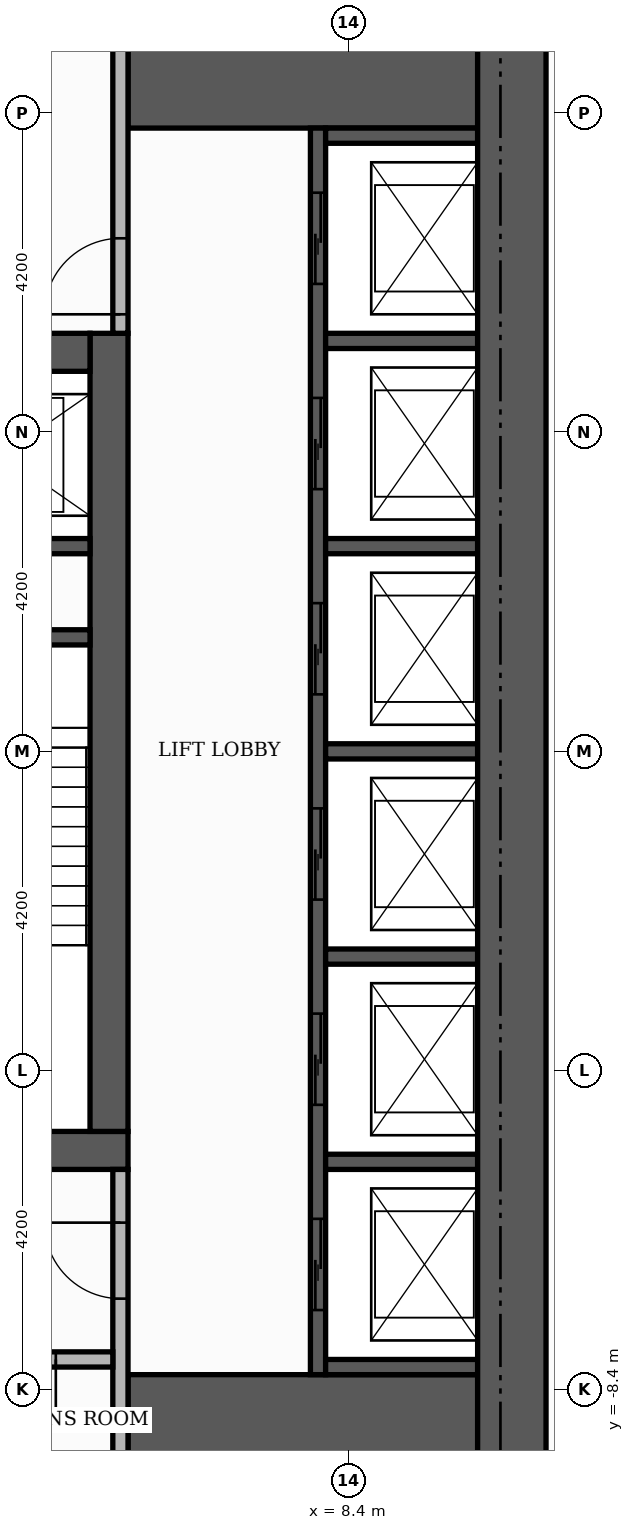
"""IFC4 building model, lengths in metres.
Left out: names, types, materials, properties, quantities, classifications, styles, units other than length and angle.
Written with IfcOpenShell. Run it as: python <this file> out.ifc"""

import sys

from ifc_helpers import new_model, si_unit, direction, frame, frame_2d, origin, place, context, subcontext, project, spatial, rectangle, extrude, element, fill, save


model = new_model("IFC4")
c1 = context("Model", 3, precision=1e-05, world=origin(), true_north=direction((0.0, 1.0)))
c2 = subcontext(c1, "Body", "Model", "MODEL_VIEW")
j1 = project(units=[si_unit("LENGTHUNIT", "METRE"), si_unit("PLANEANGLEUNIT", "RADIAN")], contexts=[c1])
p1 = place(None, origin())
s1 = spatial("IfcSite", under=j1, at=p1, CompositionType="ELEMENT")
p2 = place(p1, origin())
s2 = spatial("IfcBuilding", under=s1, at=p2, CompositionType="ELEMENT")
p3 = place(p2, frame((0.0, 0.0, 180.6)))
s3 = spatial("IfcBuildingStorey", under=s2, at=p3, CompositionType="ELEMENT", Elevation=180.6)
p4 = place(p3, frame((-5.5, -5.25, 0.0), z_axis=(0.0, 0.0, 1.0), x_axis=(1.0, 0.0, 0.0)))
e1 = element("IfcWall", 1, at=p4, inside=s3, PredefinedType="SHEAR", context=c2, shape_type="SweptSolid", body=[
    extrude(rectangle(XDim=11.0, YDim=0.5, at=frame_2d((5.5, 0.0))), origin(), (0.0, 0.0, 1.0), 7.38),
])
p5 = place(p4, frame((4.9, 0.0, 0.0)))
e2 = element("IfcOpeningElement", 2, at=p5, cuts=e1, PredefinedType="OPENING", context=c2, shape_type="SweptSolid", body=[
    extrude(rectangle(XDim=1.2, YDim=2.1, at=frame_2d((0.6, 1.05))), frame((0.0, 0.26, 0.0), z_axis=(0.0, -1.0, 0.0), x_axis=(1.0, 0.0, 0.0)), (0.0, 0.0, 1.0), 0.52),
])
p6 = place(p3, frame((5.25, -5.0, 0.0), z_axis=(0.0, 0.0, 1.0), x_axis=(0.0, 1.0, 0.0)))
e3 = element("IfcWall", 3, at=p6, inside=s3, PredefinedType="SHEAR", context=c2, shape_type="SweptSolid", body=[
    extrude(rectangle(XDim=10.5, YDim=0.5, at=frame_2d((5.25, 0.0))), origin(), (0.0, 0.0, 1.0), 7.38),
])
p7 = place(p3, frame((-5.0, 5.25, 0.0), z_axis=(0.0, 0.0, 1.0), x_axis=(1.0, 0.0, 0.0)))
e4 = element("IfcWall", 4, at=p7, inside=s3, PredefinedType="SHEAR", context=c2, shape_type="SweptSolid", body=[
    extrude(rectangle(XDim=10.0, YDim=0.5, at=frame_2d((5.0, 0.0))), origin(), (0.0, 0.0, 1.0), 7.38),
])
p8 = place(p7, frame((4.4, 0.0, 0.0)))
e5 = element("IfcOpeningElement", 5, at=p8, cuts=e4, PredefinedType="OPENING", context=c2, shape_type="SweptSolid", body=[
    extrude(rectangle(XDim=1.2, YDim=2.1, at=frame_2d((0.6, 1.05))), frame((0.0, 0.26, 0.0), z_axis=(0.0, -1.0, 0.0), x_axis=(1.0, 0.0, 0.0)), (0.0, 0.0, 1.0), 0.52),
])
for number, where, z_axis, x_axis in (
    (6, (5.5, -9.15, 0.0), (0.0, 0.0, 1.0), (1.0, 0.0, 0.0)),
    (7, (5.5, 9.15, 0.0), (0.0, 0.0, 1.0), (1.0, 0.0, 0.0)),
):
    element("IfcWall", number, at=place(p3, frame(where, z_axis=z_axis, x_axis=x_axis)), inside=s3, PredefinedType="SHEAR", context=c2, shape_type="SweptSolid", body=[
        extrude(rectangle(XDim=4.6, YDim=1.9, at=frame_2d((2.3, 0.0))), origin(), (0.0, 0.0, 1.0), 7.38),
    ])
p9 = place(p3, frame((2.15, 1.5, 0.0), z_axis=(0.0, 0.0, 1.0), x_axis=(1.0, 0.0, 0.0)))
e8 = element("IfcWall", 8, at=p9, inside=s3, PredefinedType="SHEAR", context=c2, shape_type="SweptSolid", body=[
    extrude(rectangle(XDim=2.85, YDim=0.2, at=frame_2d((1.425, 0.0))), origin(), (0.0, 0.0, 1.0), 7.38),
])
p10 = place(p3, frame((8.0, -8.2, 0.0), z_axis=(0.0, 0.0, 1.0), x_axis=(0.0, 1.0, 0.0)))
e9 = element("IfcWall", 9, at=p10, inside=s3, PredefinedType="SHEAR", context=c2, shape_type="SweptSolid", body=[
    extrude(rectangle(XDim=16.4, YDim=0.2, at=frame_2d((8.2, 0.0))), origin(), (0.0, 0.0, 1.0), 7.38),
])
p11 = place(p10, frame((0.85, 0.0, 0.0)))
e10 = element("IfcOpeningElement", 10, at=p11, cuts=e9, PredefinedType="OPENING", context=c2, shape_type="SweptSolid", body=[
    extrude(rectangle(XDim=1.2, YDim=2.1, at=frame_2d((0.6, 1.05))), frame((0.0, 0.11, 0.0), z_axis=(0.0, -1.0, 0.0), x_axis=(1.0, 0.0, 0.0)), (0.0, 0.0, 1.0), 0.22),
])
p12 = place(p10, frame((3.55, 0.0, 0.0)))
e11 = element("IfcOpeningElement", 11, at=p12, cuts=e9, PredefinedType="OPENING", context=c2, shape_type="SweptSolid", body=[
    extrude(rectangle(XDim=1.2, YDim=2.1, at=frame_2d((0.6, 1.05))), frame((0.0, 0.11, 0.0), z_axis=(0.0, -1.0, 0.0), x_axis=(1.0, 0.0, 0.0)), (0.0, 0.0, 1.0), 0.22),
])
p13 = place(p10, frame((6.25, 0.0, 0.0)))
e12 = element("IfcOpeningElement", 12, at=p13, cuts=e9, PredefinedType="OPENING", context=c2, shape_type="SweptSolid", body=[
    extrude(rectangle(XDim=1.2, YDim=2.1, at=frame_2d((0.6, 1.05))), frame((0.0, 0.11, 0.0), z_axis=(0.0, -1.0, 0.0), x_axis=(1.0, 0.0, 0.0)), (0.0, 0.0, 1.0), 0.22),
])
p14 = place(p10, frame((8.95, 0.0, 0.0)))
e13 = element("IfcOpeningElement", 13, at=p14, cuts=e9, PredefinedType="OPENING", context=c2, shape_type="SweptSolid", body=[
    extrude(rectangle(XDim=1.2, YDim=2.1, at=frame_2d((0.6, 1.05))), frame((0.0, 0.11, 0.0), z_axis=(0.0, -1.0, 0.0), x_axis=(1.0, 0.0, 0.0)), (0.0, 0.0, 1.0), 0.22),
])
p15 = place(p10, frame((11.65, 0.0, 0.0)))
e14 = element("IfcOpeningElement", 14, at=p15, cuts=e9, PredefinedType="OPENING", context=c2, shape_type="SweptSolid", body=[
    extrude(rectangle(XDim=1.2, YDim=2.1, at=frame_2d((0.6, 1.05))), frame((0.0, 0.11, 0.0), z_axis=(0.0, -1.0, 0.0), x_axis=(1.0, 0.0, 0.0)), (0.0, 0.0, 1.0), 0.22),
])
p16 = place(p10, frame((14.35, 0.0, 0.0)))
e15 = element("IfcOpeningElement", 15, at=p16, cuts=e9, PredefinedType="OPENING", context=c2, shape_type="SweptSolid", body=[
    extrude(rectangle(XDim=1.2, YDim=2.1, at=frame_2d((0.6, 1.05))), frame((0.0, 0.11, 0.0), z_axis=(0.0, -1.0, 0.0), x_axis=(1.0, 0.0, 0.0)), (0.0, 0.0, 1.0), 0.22),
])
for number, where, z_axis, x_axis in (
    (16, (8.1, -8.1, 0.0), (0.0, 0.0, 1.0), (1.0, 0.0, 0.0)),
    (17, (8.1, -5.4, 0.0), (0.0, 0.0, 1.0), (1.0, 0.0, 0.0)),
    (18, (8.1, -2.7, 0.0), (0.0, 0.0, 1.0), (1.0, 0.0, 0.0)),
    (19, (8.1, 0.0, 0.0), (0.0, 0.0, 1.0), (1.0, 0.0, 0.0)),
):
    element("IfcWall", number, at=place(p3, frame(where, z_axis=z_axis, x_axis=x_axis)), inside=s3, PredefinedType="SHEAR", context=c2, shape_type="SweptSolid", body=[
        extrude(rectangle(XDim=2.0, YDim=0.2, at=frame_2d((1.0, 0.0))), origin(), (0.0, 0.0, 1.0), 7.38),
    ])
p17 = place(p3, frame((2.15, 2.7, 0.0), z_axis=(0.0, 0.0, 1.0), x_axis=(1.0, 0.0, 0.0)))
e20 = element("IfcWall", 20, at=p17, inside=s3, PredefinedType="SHEAR", context=c2, shape_type="SweptSolid", body=[
    extrude(rectangle(XDim=2.85, YDim=0.2, at=frame_2d((1.425, 0.0))), origin(), (0.0, 0.0, 1.0), 7.38),
])
for number, where, z_axis, x_axis in (
    (21, (8.1, 2.7, 0.0), (0.0, 0.0, 1.0), (1.0, 0.0, 0.0)),
    (22, (8.1, 5.4, 0.0), (0.0, 0.0, 1.0), (1.0, 0.0, 0.0)),
    (23, (8.1, 8.1, 0.0), (0.0, 0.0, 1.0), (1.0, 0.0, 0.0)),
):
    element("IfcWall", number, at=place(p3, frame(where, z_axis=z_axis, x_axis=x_axis)), inside=s3, PredefinedType="SHEAR", context=c2, shape_type="SweptSolid", body=[
        extrude(rectangle(XDim=2.0, YDim=0.2, at=frame_2d((1.0, 0.0))), origin(), (0.0, 0.0, 1.0), 7.38),
    ])
p18 = place(p3, frame((10.55, -10.1, 0.0), z_axis=(0.0, 0.0, 1.0), x_axis=(0.0, 1.0, 0.0)))
e24 = element("IfcWall", 24, at=p18, inside=s3, PredefinedType="SHEAR", context=c2, shape_type="SweptSolid", body=[
    extrude(rectangle(XDim=20.2, YDim=0.9, at=frame_2d((10.1, 0.0))), origin(), (0.0, 0.0, 1.0), 7.38),
])
p19 = place(p3, frame((5.4, -10.1, 0.0), z_axis=(0.0, 0.0, 1.0), x_axis=(0.0, 1.0, 0.0)))
e25 = element("IfcWall", 25, at=p19, inside=s3, PredefinedType="PARTITIONING", context=c2, shape_type="SweptSolid", body=[
    extrude(rectangle(XDim=4.6, YDim=0.2, at=frame_2d((2.3, 0.0))), origin(), (0.0, 0.0, 1.0), 7.38),
])
p20 = place(p19, frame((2.9, 0.0, 0.0)))
e26 = element("IfcOpeningElement", 26, at=p20, cuts=e25, PredefinedType="OPENING", context=c2, shape_type="SweptSolid", body=[
    extrude(rectangle(XDim=1.0, YDim=2.1, at=frame_2d((0.5, 1.05))), frame((0.0, 0.11, 0.0), z_axis=(0.0, -1.0, 0.0), x_axis=(1.0, 0.0, 0.0)), (0.0, 0.0, 1.0), 0.22),
])
p21 = place(p3, frame((2.95, -8.0, 0.0), z_axis=(0.0, 0.0, 1.0), x_axis=(1.0, 0.0, 0.0)))
e27 = element("IfcWall", 27, at=p21, inside=s3, PredefinedType="PARTITIONING", context=c2, shape_type="SweptSolid", body=[
    extrude(rectangle(XDim=2.35, YDim=0.2, at=frame_2d((1.175, 0.0))), origin(), (0.0, 0.0, 1.0), 7.38),
])
p22 = place(p21, frame((0.7, 0.0, 0.0)))
e28 = element("IfcOpeningElement", 28, at=p22, cuts=e27, PredefinedType="OPENING", context=c2, shape_type="SweptSolid", body=[
    extrude(rectangle(XDim=0.9, YDim=2.1, at=frame_2d((0.45, 1.05))), frame((0.0, 0.11, 0.0), z_axis=(0.0, -1.0, 0.0), x_axis=(1.0, 0.0, 0.0)), (0.0, 0.0, 1.0), 0.22),
])
p23 = place(p3, frame((5.4, 5.5, 0.0), z_axis=(0.0, 0.0, 1.0), x_axis=(0.0, 1.0, 0.0)))
e29 = element("IfcWall", 29, at=p23, inside=s3, PredefinedType="PARTITIONING", context=c2, shape_type="SweptSolid", body=[
    extrude(rectangle(XDim=4.6, YDim=0.2, at=frame_2d((2.3, 0.0))), origin(), (0.0, 0.0, 1.0), 7.38),
])
p24 = place(p23, frame((0.25, 0.0, 0.0)))
e30 = element("IfcOpeningElement", 30, at=p24, cuts=e29, PredefinedType="OPENING", context=c2, shape_type="SweptSolid", body=[
    extrude(rectangle(XDim=1.0, YDim=2.1, at=frame_2d((0.5, 1.05))), frame((0.0, 0.11, 0.0), z_axis=(0.0, -1.0, 0.0), x_axis=(1.0, 0.0, 0.0)), (0.0, 0.0, 1.0), 0.22),
])
p25 = place(p11, origin())
e31 = element("IfcDoor", 31, at=p25, inside=s3, OperationType="SLIDING_TO_LEFT", PredefinedType="DOOR", context=c2, shape_type="SweptSolid", body=[
    extrude(rectangle(XDim=1.2, YDim=2.1, at=frame_2d((0.6, 1.05))), frame((0.0, 0.025, 0.0), z_axis=(0.0, -1.0, 0.0), x_axis=(1.0, 0.0, 0.0)), (0.0, 0.0, 1.0), 0.05),
])
fill(e10, e31)
p26 = place(p12, origin())
e32 = element("IfcDoor", 32, at=p26, inside=s3, OperationType="SLIDING_TO_LEFT", PredefinedType="DOOR", context=c2, shape_type="SweptSolid", body=[
    extrude(rectangle(XDim=1.2, YDim=2.1, at=frame_2d((0.6, 1.05))), frame((0.0, 0.025, 0.0), z_axis=(0.0, -1.0, 0.0), x_axis=(1.0, 0.0, 0.0)), (0.0, 0.0, 1.0), 0.05),
])
fill(e11, e32)
p27 = place(p13, origin())
e33 = element("IfcDoor", 33, at=p27, inside=s3, OperationType="SLIDING_TO_LEFT", PredefinedType="DOOR", context=c2, shape_type="SweptSolid", body=[
    extrude(rectangle(XDim=1.2, YDim=2.1, at=frame_2d((0.6, 1.05))), frame((0.0, 0.025, 0.0), z_axis=(0.0, -1.0, 0.0), x_axis=(1.0, 0.0, 0.0)), (0.0, 0.0, 1.0), 0.05),
])
fill(e12, e33)
p28 = place(p14, origin())
e34 = element("IfcDoor", 34, at=p28, inside=s3, OperationType="SLIDING_TO_LEFT", PredefinedType="DOOR", context=c2, shape_type="SweptSolid", body=[
    extrude(rectangle(XDim=1.2, YDim=2.1, at=frame_2d((0.6, 1.05))), frame((0.0, 0.025, 0.0), z_axis=(0.0, -1.0, 0.0), x_axis=(1.0, 0.0, 0.0)), (0.0, 0.0, 1.0), 0.05),
])
fill(e13, e34)
p29 = place(p15, origin())
e35 = element("IfcDoor", 35, at=p29, inside=s3, OperationType="SLIDING_TO_LEFT", PredefinedType="DOOR", context=c2, shape_type="SweptSolid", body=[
    extrude(rectangle(XDim=1.2, YDim=2.1, at=frame_2d((0.6, 1.05))), frame((0.0, 0.025, 0.0), z_axis=(0.0, -1.0, 0.0), x_axis=(1.0, 0.0, 0.0)), (0.0, 0.0, 1.0), 0.05),
])
fill(e14, e35)
p30 = place(p16, origin())
e36 = element("IfcDoor", 36, at=p30, inside=s3, OperationType="SLIDING_TO_LEFT", PredefinedType="DOOR", context=c2, shape_type="SweptSolid", body=[
    extrude(rectangle(XDim=1.2, YDim=2.1, at=frame_2d((0.6, 1.05))), frame((0.0, 0.025, 0.0), z_axis=(0.0, -1.0, 0.0), x_axis=(1.0, 0.0, 0.0)), (0.0, 0.0, 1.0), 0.05),
])
fill(e15, e36)
p31 = place(p24, origin())
e37 = element("IfcDoor", 37, at=p31, inside=s3, OperationType="SINGLE_SWING_LEFT", PredefinedType="DOOR", context=c2, shape_type="SweptSolid", body=[
    extrude(rectangle(XDim=1.0, YDim=2.1, at=frame_2d((0.5, 1.05))), frame((0.0, 0.025, 0.0), z_axis=(0.0, -1.0, 0.0), x_axis=(1.0, 0.0, 0.0)), (0.0, 0.0, 1.0), 0.05),
])
fill(e30, e37)
p32 = place(p20, origin())
e38 = element("IfcDoor", 38, at=p32, inside=s3, OperationType="SINGLE_SWING_RIGHT", PredefinedType="DOOR", context=c2, shape_type="SweptSolid", body=[
    extrude(rectangle(XDim=1.0, YDim=2.1, at=frame_2d((0.5, 1.05))), frame((0.0, 0.025, 0.0), z_axis=(0.0, -1.0, 0.0), x_axis=(1.0, 0.0, 0.0)), (0.0, 0.0, 1.0), 0.05),
])
fill(e26, e38)
p33 = place(p22, frame((0.9, 0.0, 0.0), z_axis=(0.0, 0.0, 1.0), x_axis=(-1.0, 0.0, 0.0)))
e39 = element("IfcDoor", 39, at=p33, inside=s3, OperationType="SINGLE_SWING_RIGHT", PredefinedType="DOOR", context=c2, shape_type="SweptSolid", body=[
    extrude(rectangle(XDim=0.9, YDim=2.1, at=frame_2d((0.45, 1.05))), frame((0.0, 0.025, 0.0), z_axis=(0.0, -1.0, 0.0), x_axis=(1.0, 0.0, 0.0)), (0.0, 0.0, 1.0), 0.05),
])
fill(e28, e39)
save(model, sys.argv[1])
